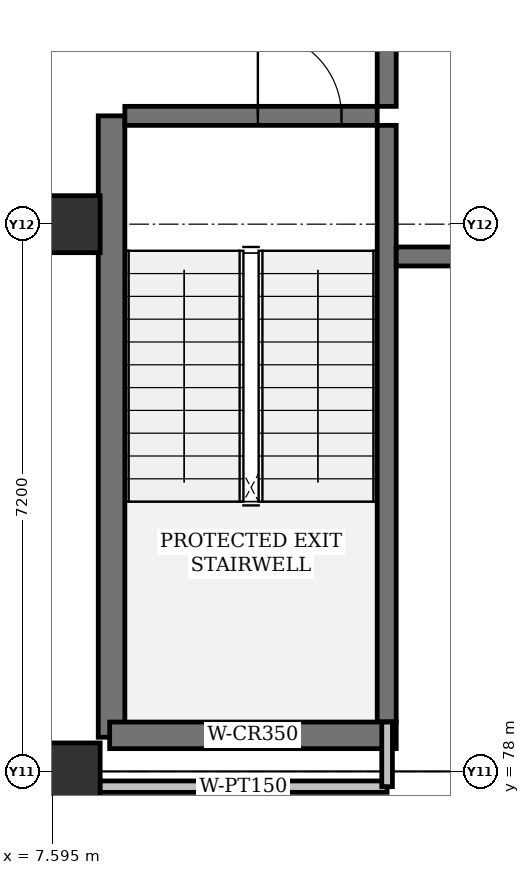
"""IFC4 building model, lengths in metres.
Left out: names, types, materials, properties, quantities, classifications, styles, units other than length and angle.
Written with IfcOpenShell. Run it as: python <this file> out.ifc"""

import sys

from ifc_helpers import new_model, si_unit, direction, frame, frame_2d, origin, origin_2d, place, context, subcontext, project, spatial, rectangle, extrude, element, fill, save


model = new_model("IFC4")
c1 = context("Model", 3, precision=1e-05, world=origin(), true_north=direction((0.0, 1.0)))
c2 = subcontext(c1, "Body", "Model", "MODEL_VIEW")
j1 = project(units=[si_unit("LENGTHUNIT", "METRE"), si_unit("PLANEANGLEUNIT", "RADIAN")], contexts=[c1])
p1 = place(None, origin())
s1 = spatial("IfcSite", under=j1, at=p1, CompositionType="ELEMENT")
p2 = place(p1, origin())
s2 = spatial("IfcBuilding", under=s1, at=p2, CompositionType="ELEMENT")
p3 = place(p2, frame((0.0, 0.0, -4.2)))
s3 = spatial("IfcBuildingStorey", under=s2, at=p3, CompositionType="ELEMENT", Elevation=-4.2)
for number, where, z_axis, x_axis in (
    (1, (7.85, 78.0, 0.0), (0.0, 0.0, 1.0), (1.0, 0.0, 0.0)),
    (2, (7.85, 85.2, 0.0), (0.0, 0.0, 1.0), (1.0, 0.0, 0.0)),
):
    element("IfcColumn", number, at=place(p3, frame(where, z_axis=z_axis, x_axis=x_axis)), inside=s3, PredefinedType="COLUMN", context=c2, shape_type="SweptSolid", body=[
        extrude(rectangle(XDim=0.75, YDim=0.75, at=origin_2d()), origin(), (0.0, 0.0, 1.0), 4.2),
    ])
p4 = place(p3, frame((8.375, 78.45, 0.0), z_axis=(0.0, 0.0, 1.0), x_axis=(0.0, 1.0, 0.0)))
e3 = element("IfcWall", 3, at=p4, inside=s3, PredefinedType="SHEAR", context=c2, shape_type="SweptSolid", body=[
    extrude(rectangle(XDim=8.175, YDim=0.35, at=frame_2d((4.087, 0.0))), origin(), (0.0, 0.0, 1.0), 4.2),
])
p5 = place(p3, frame((11.995, 78.65, 0.0), z_axis=(0.0, 0.0, 1.0), x_axis=(0.0, 1.0, 0.0)))
e4 = element("IfcWall", 4, at=p5, inside=s3, PredefinedType="SHEAR", context=c2, shape_type="SweptSolid", body=[
    extrude(rectangle(XDim=7.85, YDim=0.25, at=frame_2d((3.925, 0.0))), origin(), (0.0, 0.0, 1.0), 4.2),
])
p6 = place(p3, frame((11.995, 86.75, 0.0), z_axis=(0.0, 0.0, 1.0), x_axis=(0.0, 1.0, 0.0)))
e5 = element("IfcWall", 5, at=p6, inside=s3, PredefinedType="SHEAR", context=c2, shape_type="SweptSolid", body=[
    extrude(rectangle(XDim=3.9, YDim=0.25, at=frame_2d((1.95, 0.0))), origin(), (0.0, 0.0, 1.0), 4.2),
])
p7 = place(p6, frame((1.3, 0.0, 0.0)))
e6 = element("IfcOpeningElement", 6, at=p7, cuts=e5, PredefinedType="OPENING", context=c2, shape_type="SweptSolid", body=[
    extrude(rectangle(XDim=1.25, YDim=2.2, at=frame_2d((0.625, 1.1))), frame((0.0, 0.125, 0.0), z_axis=(0.0, -1.0, 0.0), x_axis=(1.0, 0.0, 0.0)), (0.0, 0.0, 1.0), 0.25),
])
p8 = place(p3, frame((8.35, 78.475, 0.0), z_axis=(0.0, 0.0, 1.0), x_axis=(1.0, 0.0, 0.0)))
e7 = element("IfcWall", 7, at=p8, inside=s3, PredefinedType="SHEAR", context=c2, shape_type="SweptSolid", body=[
    extrude(rectangle(XDim=3.77, YDim=0.35, at=frame_2d((1.885, 0.0))), origin(), (0.0, 0.0, 1.0), 4.2),
])
p9 = place(p3, frame((8.55, 86.625, 0.0), z_axis=(0.0, 0.0, 1.0), x_axis=(1.0, 0.0, 0.0)))
e8 = element("IfcWall", 8, at=p9, inside=s3, PredefinedType="SHEAR", context=c2, shape_type="SweptSolid", body=[
    extrude(rectangle(XDim=3.32, YDim=0.25, at=frame_2d((1.66, 0.0))), origin(), (0.0, 0.0, 1.0), 4.2),
])
p10 = place(p9, frame((1.75, 0.0, 0.0)))
e9 = element("IfcOpeningElement", 9, at=p10, cuts=e8, PredefinedType="OPENING", context=c2, shape_type="SweptSolid", body=[
    extrude(rectangle(XDim=1.1, YDim=2.15, at=frame_2d((0.55, 1.075))), frame((0.0, 0.125, 0.0), z_axis=(0.0, -1.0, 0.0), x_axis=(1.0, 0.0, 0.0)), (0.0, 0.0, 1.0), 0.25),
])
p11 = place(p3, frame((12.12, 84.775, 0.0), z_axis=(0.0, 0.0, 1.0), x_axis=(1.0, 0.0, 0.0)))
e10 = element("IfcWall", 10, at=p11, inside=s3, PredefinedType="SHEAR", context=c2, shape_type="SweptSolid", body=[
    extrude(rectangle(XDim=4.03, YDim=0.25, at=frame_2d((2.015, 0.0))), origin(), (0.0, 0.0, 1.0), 4.2),
])
p12 = place(p11, frame((1.3, 0.0, 0.0)))
e11 = element("IfcOpeningElement", 11, at=p12, cuts=e10, PredefinedType="OPENING", context=c2, shape_type="SweptSolid", body=[
    extrude(rectangle(XDim=1.4, YDim=2.25, at=frame_2d((0.7, 1.125))), frame((0.0, 0.125, 0.0), z_axis=(0.0, -1.0, 0.0), x_axis=(1.0, 0.0, 0.0)), (0.0, 0.0, 1.0), 0.25),
])
p13 = place(p3, frame((8.22, 77.8, 0.0), z_axis=(0.0, 0.0, 1.0), x_axis=(1.0, 0.0, 0.0)))
e12 = element("IfcWall", 12, at=p13, inside=s3, PredefinedType="PARTITIONING", context=c2, shape_type="SweptSolid", body=[
    extrude(rectangle(XDim=3.78, YDim=0.15, at=frame_2d((1.89, 0.0))), origin(), (0.0, 0.0, 1.0), 3.401),
])
p14 = place(p3, frame((12.0, 77.8, 0.0), z_axis=(0.0, 0.0, 1.0), x_axis=(0.0, 1.0, 0.0)))
e13 = element("IfcWall", 13, at=p14, inside=s3, PredefinedType="PARTITIONING", context=c2, shape_type="SweptSolid", body=[
    extrude(rectangle(XDim=0.85, YDim=0.14, at=frame_2d((0.425, 0.0))), origin(), (0.0, 0.0, 1.0), 3.401),
])
p15 = place(p10, origin())
e14 = element("IfcDoor", 14, at=p15, inside=s3, OperationType="SINGLE_SWING_LEFT", PredefinedType="DOOR", context=c2, shape_type="SweptSolid", body=[
    extrude(rectangle(XDim=1.1, YDim=2.15, at=frame_2d((0.55, 1.075))), frame((0.0, 0.025, 0.0), z_axis=(0.0, -1.0, 0.0), x_axis=(1.0, 0.0, 0.0)), (0.0, 0.0, 1.0), 0.05),
])
fill(e9, e14)
save(model, sys.argv[1])
